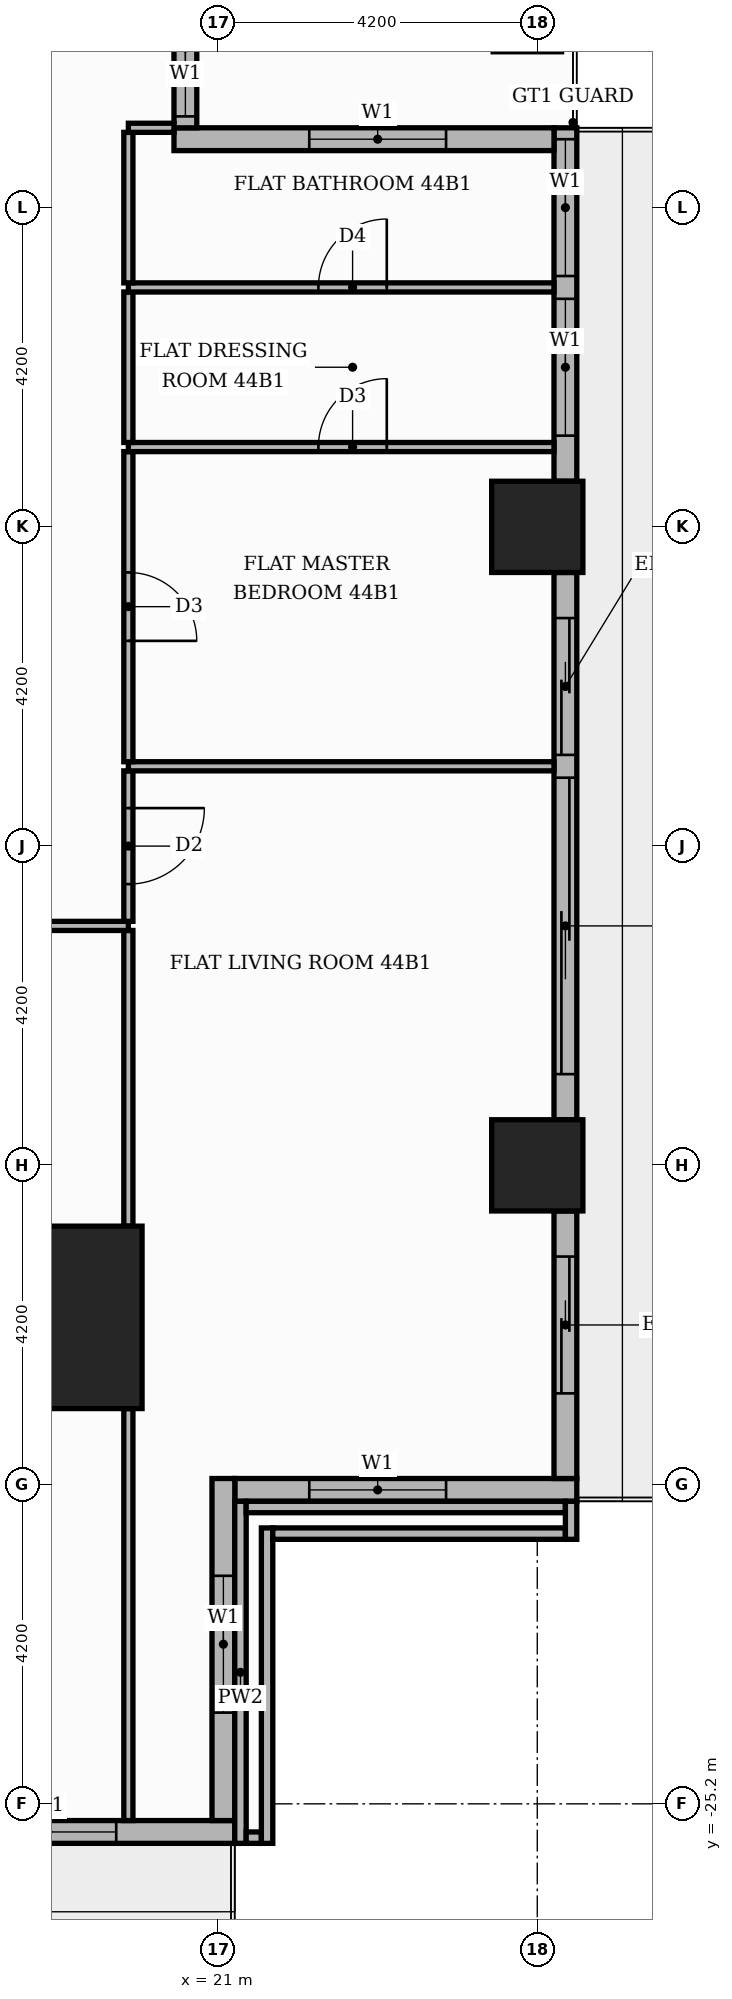
"""IFC4 building model, lengths in metres.
Left out: names, types, materials, properties, quantities, classifications, styles, units other than length and angle.
Written with IfcOpenShell. Run it as: python <this file> out.ifc"""

import sys

from ifc_helpers import new_model, si_unit, direction, frame, frame_2d, origin, origin_2d, place, context, subcontext, project, spatial, rectangle, extrude, element, fill, save


model = new_model("IFC4")
c1 = context("Model", 3, precision=1e-05, world=origin(), true_north=direction((0.0, 1.0)))
c2 = subcontext(c1, "Body", "Model", "MODEL_VIEW")
j1 = project(units=[si_unit("LENGTHUNIT", "METRE"), si_unit("PLANEANGLEUNIT", "RADIAN")], contexts=[c1])
p1 = place(None, origin())
s1 = spatial("IfcSite", under=j1, at=p1, CompositionType="ELEMENT")
p2 = place(p1, origin())
s2 = spatial("IfcBuilding", under=s1, at=p2, CompositionType="ELEMENT")
p3 = place(p2, frame((0.0, 0.0, 188.4)))
s3 = spatial("IfcBuildingStorey", under=s2, at=p3, CompositionType="ELEMENT", Elevation=188.4)
p4 = place(p3, frame((18.8, -18.8, 0.0), z_axis=(0.0, 0.0, 1.0), x_axis=(1.0, 0.0, 0.0)))
e1 = element("IfcColumn", 1, at=p4, inside=s3, PredefinedType="COLUMN", context=c2, shape_type="SweptSolid", body=[
    extrude(rectangle(XDim=2.4, YDim=2.4, at=origin_2d()), origin(), (0.0, 0.0, 1.0), 3.9),
])
for number, where, z_axis, x_axis in (
    (2, (25.2, -8.4, 0.0), (0.0, 0.0, 1.0), (1.0, 0.0, 0.0)),
    (3, (25.2, -16.8, 0.0), (0.0, 0.0, 1.0), (1.0, 0.0, 0.0)),
):
    element("IfcColumn", number, at=place(p3, frame(where, z_axis=z_axis, x_axis=x_axis)), inside=s3, PredefinedType="COLUMN", context=c2, shape_type="SweptSolid", body=[
        extrude(rectangle(XDim=1.2, YDim=1.2, at=origin_2d()), origin(), (0.0, 0.0, 1.0), 3.9),
    ])
p5 = place(p3, frame((21.22, -21.07, 0.0), z_axis=(0.0, 0.0, 1.0), x_axis=(1.0, 0.0, 0.0)))
e4 = element("IfcWall", 4, at=p5, inside=s3, PredefinedType="STANDARD", context=c2, shape_type="SweptSolid", body=[
    extrude(rectangle(XDim=4.5, YDim=0.3, at=frame_2d((2.25, 0.0))), origin(), (0.0, 0.0, 1.0), 3.48),
])
p6 = place(p5, frame((0.98, 0.0, 0.9)))
e5 = element("IfcOpeningElement", 5, at=p6, cuts=e4, PredefinedType="OPENING", context=c2, shape_type="SweptSolid", body=[
    extrude(rectangle(XDim=1.8, YDim=2.1, at=frame_2d((0.9, 1.05))), frame((0.0, 0.16, 0.0), z_axis=(0.0, -1.0, 0.0), x_axis=(1.0, 0.0, 0.0)), (0.0, 0.0, 1.0), 0.32),
])
p7 = place(p3, frame((25.57, -20.92, 0.0), z_axis=(0.0, 0.0, 1.0), x_axis=(0.0, 1.0, 0.0)))
e6 = element("IfcWall", 6, at=p7, inside=s3, PredefinedType="STANDARD", context=c2, shape_type="SweptSolid", body=[
    extrude(rectangle(XDim=3.52, YDim=0.3, at=frame_2d((1.76, 0.0))), origin(), (0.0, 0.0, 1.0), 3.48),
])
p8 = place(p7, frame((1.12, 0.0, 0.0)))
e7 = element("IfcOpeningElement", 7, at=p8, cuts=e6, PredefinedType="OPENING", context=c2, shape_type="SweptSolid", body=[
    extrude(rectangle(XDim=1.8, YDim=2.4, at=frame_2d((0.9, 1.2))), frame((0.0, 0.16, 0.0), z_axis=(0.0, -1.0, 0.0), x_axis=(1.0, 0.0, 0.0)), (0.0, 0.0, 1.0), 0.32),
])
p9 = place(p3, frame((25.57, -16.2, 0.0), z_axis=(0.0, 0.0, 1.0), x_axis=(0.0, 1.0, 0.0)))
e8 = element("IfcWall", 8, at=p9, inside=s3, PredefinedType="STANDARD", context=c2, shape_type="SweptSolid", body=[
    extrude(rectangle(XDim=7.2, YDim=0.3, at=frame_2d((3.6, 0.0))), origin(), (0.0, 0.0, 1.0), 3.48),
])
p10 = place(p9, frame((0.6, 0.0, 0.0)))
e9 = element("IfcOpeningElement", 9, at=p10, cuts=e8, PredefinedType="OPENING", context=c2, shape_type="SweptSolid", body=[
    extrude(rectangle(XDim=3.9, YDim=2.4, at=frame_2d((1.95, 1.2))), frame((0.0, 0.16, 0.0), z_axis=(0.0, -1.0, 0.0), x_axis=(1.0, 0.0, 0.0)), (0.0, 0.0, 1.0), 0.32),
])
p11 = place(p9, frame((4.8, 0.0, 0.0)))
e10 = element("IfcOpeningElement", 10, at=p11, cuts=e8, PredefinedType="OPENING", context=c2, shape_type="SweptSolid", body=[
    extrude(rectangle(XDim=1.8, YDim=2.4, at=frame_2d((0.9, 1.2))), frame((0.0, 0.16, 0.0), z_axis=(0.0, -1.0, 0.0), x_axis=(1.0, 0.0, 0.0)), (0.0, 0.0, 1.0), 0.32),
])
p12 = place(p3, frame((25.57, -7.8, 0.0), z_axis=(0.0, 0.0, 1.0), x_axis=(0.0, 1.0, 0.0)))
e11 = element("IfcWall", 11, at=p12, inside=s3, PredefinedType="STANDARD", context=c2, shape_type="SweptSolid", body=[
    extrude(rectangle(XDim=4.65, YDim=0.3, at=frame_2d((2.325, 0.0))), origin(), (0.0, 0.0, 1.0), 3.48),
])
p13 = place(p12, frame((0.6, 0.0, 0.9)))
e12 = element("IfcOpeningElement", 12, at=p13, cuts=e11, PredefinedType="OPENING", context=c2, shape_type="SweptSolid", body=[
    extrude(rectangle(XDim=1.8, YDim=2.1, at=frame_2d((0.9, 1.05))), frame((0.0, 0.16, 0.0), z_axis=(0.0, -1.0, 0.0), x_axis=(1.0, 0.0, 0.0)), (0.0, 0.0, 1.0), 0.32),
])
p14 = place(p12, frame((2.7, 0.0, 0.9)))
e13 = element("IfcOpeningElement", 13, at=p14, cuts=e11, PredefinedType="OPENING", context=c2, shape_type="SweptSolid", body=[
    extrude(rectangle(XDim=1.8, YDim=2.1, at=frame_2d((0.9, 1.05))), frame((0.0, 0.16, 0.0), z_axis=(0.0, -1.0, 0.0), x_axis=(1.0, 0.0, 0.0)), (0.0, 0.0, 1.0), 0.32),
])
p15 = place(p3, frame((25.42, -3.3, 0.0), z_axis=(0.0, 0.0, 1.0), x_axis=(-1.0, 0.0, 0.0)))
e14 = element("IfcWall", 14, at=p15, inside=s3, PredefinedType="STANDARD", context=c2, shape_type="SweptSolid", body=[
    extrude(rectangle(XDim=5.0, YDim=0.3, at=frame_2d((2.5, 0.0))), origin(), (0.0, 0.0, 1.0), 3.48),
])
p16 = place(p15, frame((1.42, 0.0, 0.9)))
e15 = element("IfcOpeningElement", 15, at=p16, cuts=e14, PredefinedType="OPENING", context=c2, shape_type="SweptSolid", body=[
    extrude(rectangle(XDim=1.8, YDim=2.1, at=frame_2d((0.9, 1.05))), frame((0.0, 0.16, 0.0), z_axis=(0.0, -1.0, 0.0), x_axis=(1.0, 0.0, 0.0)), (0.0, 0.0, 1.0), 0.32),
])
p17 = place(p3, frame((20.57, -3.15, 0.0), z_axis=(0.0, 0.0, 1.0), x_axis=(0.0, 1.0, 0.0)))
e16 = element("IfcWall", 16, at=p17, inside=s3, PredefinedType="STANDARD", context=c2, shape_type="SweptSolid", body=[
    extrude(rectangle(XDim=6.6, YDim=0.3, at=frame_2d((3.3, 0.0))), origin(), (0.0, 0.0, 1.0), 3.48),
])
p18 = place(p17, frame((0.15, 0.0, 0.9)))
e17 = element("IfcOpeningElement", 17, at=p18, cuts=e16, PredefinedType="OPENING", context=c2, shape_type="SweptSolid", body=[
    extrude(rectangle(XDim=1.8, YDim=2.1, at=frame_2d((0.9, 1.05))), frame((0.0, 0.16, 0.0), z_axis=(0.0, -1.0, 0.0), x_axis=(1.0, 0.0, 0.0)), (0.0, 0.0, 1.0), 0.32),
])
p19 = place(p17, frame((2.25, 0.0, 0.0)))
e18 = element("IfcOpeningElement", 18, at=p19, cuts=e16, PredefinedType="OPENING", context=c2, shape_type="SweptSolid", body=[
    extrude(rectangle(XDim=1.8, YDim=2.4, at=frame_2d((0.9, 1.2))), frame((0.0, 0.16, 0.0), z_axis=(0.0, -1.0, 0.0), x_axis=(1.0, 0.0, 0.0)), (0.0, 0.0, 1.0), 0.32),
])
p20 = place(p17, frame((4.35, 0.0, 0.9)))
e19 = element("IfcOpeningElement", 19, at=p20, cuts=e16, PredefinedType="OPENING", context=c2, shape_type="SweptSolid", body=[
    extrude(rectangle(XDim=1.8, YDim=2.1, at=frame_2d((0.9, 1.05))), frame((0.0, 0.16, 0.0), z_axis=(0.0, -1.0, 0.0), x_axis=(1.0, 0.0, 0.0)), (0.0, 0.0, 1.0), 0.32),
])
p21 = place(p3, frame((17.4, -25.57, 0.0), z_axis=(0.0, 0.0, 1.0), x_axis=(1.0, 0.0, 0.0)))
e20 = element("IfcWall", 20, at=p21, inside=s3, PredefinedType="STANDARD", context=c2, shape_type="SweptSolid", body=[
    extrude(rectangle(XDim=3.82, YDim=0.3, at=frame_2d((1.91, 0.0))), origin(), (0.0, 0.0, 1.0), 3.48),
])
p22 = place(p21, frame((0.46, 0.0, 0.9)))
e21 = element("IfcOpeningElement", 21, at=p22, cuts=e20, PredefinedType="OPENING", context=c2, shape_type="SweptSolid", body=[
    extrude(rectangle(XDim=1.8, YDim=2.1, at=frame_2d((0.9, 1.05))), frame((0.0, 0.16, 0.0), z_axis=(0.0, -1.0, 0.0), x_axis=(1.0, 0.0, 0.0)), (0.0, 0.0, 1.0), 0.32),
])
p23 = place(p3, frame((21.07, -25.42, 0.0), z_axis=(0.0, 0.0, 1.0), x_axis=(0.0, 1.0, 0.0)))
e22 = element("IfcWall", 22, at=p23, inside=s3, PredefinedType="STANDARD", context=c2, shape_type="SweptSolid", body=[
    extrude(rectangle(XDim=4.5, YDim=0.3, at=frame_2d((2.25, 0.0))), origin(), (0.0, 0.0, 1.0), 3.48),
])
p24 = place(p23, frame((1.42, 0.0, 0.9)))
e23 = element("IfcOpeningElement", 23, at=p24, cuts=e22, PredefinedType="OPENING", context=c2, shape_type="SweptSolid", body=[
    extrude(rectangle(XDim=1.8, YDim=2.1, at=frame_2d((0.9, 1.05))), frame((0.0, 0.16, 0.0), z_axis=(0.0, -1.0, 0.0), x_axis=(1.0, 0.0, 0.0)), (0.0, 0.0, 1.0), 0.32),
])
p25 = place(p3, frame((21.295, -25.72, 0.0), z_axis=(0.0, 0.0, 1.0), x_axis=(0.0, 1.0, 0.0)))
e24 = element("IfcWall", 24, at=p25, inside=s3, PredefinedType="PARAPET", context=c2, shape_type="SweptSolid", body=[
    extrude(rectangle(XDim=4.5, YDim=0.15, at=frame_2d((2.25, 0.0))), origin(), (0.0, 0.0, 1.0), 1.1),
])
p26 = place(p3, frame((21.37, -25.645, 0.0), z_axis=(0.0, 0.0, 1.0), x_axis=(1.0, 0.0, 0.0)))
e25 = element("IfcWall", 25, at=p26, inside=s3, PredefinedType="PARAPET", context=c2, shape_type="SweptSolid", body=[
    extrude(rectangle(XDim=0.2, YDim=0.15, at=frame_2d((0.1, 0.0))), origin(), (0.0, 0.0, 1.0), 1.1),
])
p27 = place(p3, frame((21.37, -21.295, 0.0), z_axis=(0.0, 0.0, 1.0), x_axis=(1.0, 0.0, 0.0)))
e26 = element("IfcWall", 26, at=p27, inside=s3, PredefinedType="PARAPET", context=c2, shape_type="SweptSolid", body=[
    extrude(rectangle(XDim=4.2, YDim=0.15, at=frame_2d((2.1, 0.0))), origin(), (0.0, 0.0, 1.0), 1.1),
])
p28 = place(p3, frame((21.645, -25.72, 0.0), z_axis=(0.0, 0.0, 1.0), x_axis=(0.0, 1.0, 0.0)))
e27 = element("IfcWall", 27, at=p28, inside=s3, PredefinedType="PARAPET", context=c2, shape_type="SweptSolid", body=[
    extrude(rectangle(XDim=4.15, YDim=0.15, at=frame_2d((2.075, 0.0))), origin(), (0.0, 0.0, 1.0), 1.1),
])
p29 = place(p3, frame((21.72, -21.645, 0.0), z_axis=(0.0, 0.0, 1.0), x_axis=(1.0, 0.0, 0.0)))
e28 = element("IfcWall", 28, at=p29, inside=s3, PredefinedType="PARAPET", context=c2, shape_type="SweptSolid", body=[
    extrude(rectangle(XDim=3.85, YDim=0.15, at=frame_2d((1.925, 0.0))), origin(), (0.0, 0.0, 1.0), 1.1),
])
p30 = place(p3, frame((25.645, -21.72, 0.0), z_axis=(0.0, 0.0, 1.0), x_axis=(0.0, 1.0, 0.0)))
e29 = element("IfcWall", 29, at=p30, inside=s3, PredefinedType="PARAPET", context=c2, shape_type="SweptSolid", body=[
    extrude(rectangle(XDim=0.5, YDim=0.15, at=frame_2d((0.25, 0.0))), origin(), (0.0, 0.0, 1.0), 1.1),
])
p31 = place(p3, frame((19.82, -25.42, 0.0), z_axis=(0.0, 0.0, 1.0), x_axis=(0.0, 1.0, 0.0)))
e30 = element("IfcWall", 30, at=p31, inside=s3, PredefinedType="PARTITIONING", context=c2, shape_type="SweptSolid", body=[
    extrude(rectangle(XDim=5.42, YDim=0.12, at=frame_2d((2.71, 0.0))), origin(), (0.0, 0.0, 1.0), 3.48),
])
p32 = place(p3, frame((19.82, -17.6, 0.0), z_axis=(0.0, 0.0, 1.0), x_axis=(0.0, 1.0, 0.0)))
e31 = element("IfcWall", 31, at=p32, inside=s3, PredefinedType="PARTITIONING", context=c2, shape_type="SweptSolid", body=[
    extrude(rectangle(XDim=3.89, YDim=0.12, at=frame_2d((1.945, 0.0))), origin(), (0.0, 0.0, 1.0), 3.48),
])
p33 = place(p3, frame((13.65, -13.65, 0.0), z_axis=(0.0, 0.0, 1.0), x_axis=(1.0, 0.0, 0.0)))
e32 = element("IfcWall", 32, at=p33, inside=s3, PredefinedType="PARTITIONING", context=c2, shape_type="SweptSolid", body=[
    extrude(rectangle(XDim=6.17, YDim=0.12, at=frame_2d((3.085, 0.0))), origin(), (0.0, 0.0, 1.0), 3.48),
])
p34 = place(p33, frame((2.635, 0.0, 0.0)))
e33 = element("IfcOpeningElement", 33, at=p34, cuts=e32, PredefinedType="OPENING", context=c2, shape_type="SweptSolid", body=[
    extrude(rectangle(XDim=0.9, YDim=2.1, at=frame_2d((0.45, 1.05))), frame((0.0, 0.07, 0.0), z_axis=(0.0, -1.0, 0.0), x_axis=(1.0, 0.0, 0.0)), (0.0, 0.0, 1.0), 0.14),
])
p35 = place(p3, frame((19.82, -13.59, 0.0), z_axis=(0.0, 0.0, 1.0), x_axis=(0.0, 1.0, 0.0)))
e34 = element("IfcWall", 34, at=p35, inside=s3, PredefinedType="PARTITIONING", context=c2, shape_type="SweptSolid", body=[
    extrude(rectangle(XDim=1.98, YDim=0.12, at=frame_2d((0.99, 0.0))), origin(), (0.0, 0.0, 1.0), 3.48),
])
p36 = place(p35, frame((0.49, 0.0, 0.0)))
e35 = element("IfcOpeningElement", 35, at=p36, cuts=e34, PredefinedType="OPENING", context=c2, shape_type="SweptSolid", body=[
    extrude(rectangle(XDim=1.0, YDim=2.1, at=frame_2d((0.5, 1.05))), frame((0.0, 0.07, 0.0), z_axis=(0.0, -1.0, 0.0), x_axis=(1.0, 0.0, 0.0)), (0.0, 0.0, 1.0), 0.14),
])
p37 = place(p3, frame((19.82, -11.55, 0.0), z_axis=(0.0, 0.0, 1.0), x_axis=(1.0, 0.0, 0.0)))
e36 = element("IfcWall", 36, at=p37, inside=s3, PredefinedType="PARTITIONING", context=c2, shape_type="SweptSolid", body=[
    extrude(rectangle(XDim=5.6, YDim=0.12, at=frame_2d((2.8, 0.0))), origin(), (0.0, 0.0, 1.0), 3.48),
])
p38 = place(p3, frame((19.82, -11.49, 0.0), z_axis=(0.0, 0.0, 1.0), x_axis=(0.0, 1.0, 0.0)))
e37 = element("IfcWall", 37, at=p38, inside=s3, PredefinedType="PARTITIONING", context=c2, shape_type="SweptSolid", body=[
    extrude(rectangle(XDim=4.08, YDim=0.12, at=frame_2d((2.04, 0.0))), origin(), (0.0, 0.0, 1.0), 3.48),
])
p39 = place(p38, frame((1.59, 0.0, 0.0)))
e38 = element("IfcOpeningElement", 38, at=p39, cuts=e37, PredefinedType="OPENING", context=c2, shape_type="SweptSolid", body=[
    extrude(rectangle(XDim=0.9, YDim=2.1, at=frame_2d((0.45, 1.05))), frame((0.0, 0.07, 0.0), z_axis=(0.0, -1.0, 0.0), x_axis=(1.0, 0.0, 0.0)), (0.0, 0.0, 1.0), 0.14),
])
p40 = place(p3, frame((19.82, -7.35, 0.0), z_axis=(0.0, 0.0, 1.0), x_axis=(1.0, 0.0, 0.0)))
e39 = element("IfcWall", 39, at=p40, inside=s3, PredefinedType="PARTITIONING", context=c2, shape_type="SweptSolid", body=[
    extrude(rectangle(XDim=5.6, YDim=0.12, at=frame_2d((2.8, 0.0))), origin(), (0.0, 0.0, 1.0), 3.48),
])
p41 = place(p40, frame((2.5, 0.0, 0.0)))
e40 = element("IfcOpeningElement", 40, at=p41, cuts=e39, PredefinedType="OPENING", context=c2, shape_type="SweptSolid", body=[
    extrude(rectangle(XDim=0.9, YDim=2.1, at=frame_2d((0.45, 1.05))), frame((0.0, 0.07, 0.0), z_axis=(0.0, -1.0, 0.0), x_axis=(1.0, 0.0, 0.0)), (0.0, 0.0, 1.0), 0.14),
])
p42 = place(p3, frame((19.82, -7.29, 0.0), z_axis=(0.0, 0.0, 1.0), x_axis=(0.0, 1.0, 0.0)))
e41 = element("IfcWall", 41, at=p42, inside=s3, PredefinedType="PARTITIONING", context=c2, shape_type="SweptSolid", body=[
    extrude(rectangle(XDim=1.98, YDim=0.12, at=frame_2d((0.99, 0.0))), origin(), (0.0, 0.0, 1.0), 3.48),
])
p43 = place(p3, frame((19.82, -5.25, 0.0), z_axis=(0.0, 0.0, 1.0), x_axis=(1.0, 0.0, 0.0)))
e42 = element("IfcWall", 42, at=p43, inside=s3, PredefinedType="PARTITIONING", context=c2, shape_type="SweptSolid", body=[
    extrude(rectangle(XDim=5.6, YDim=0.12, at=frame_2d((2.8, 0.0))), origin(), (0.0, 0.0, 1.0), 3.48),
])
p44 = place(p43, frame((2.5, 0.0, 0.0)))
e43 = element("IfcOpeningElement", 43, at=p44, cuts=e42, PredefinedType="OPENING", context=c2, shape_type="SweptSolid", body=[
    extrude(rectangle(XDim=0.9, YDim=2.1, at=frame_2d((0.45, 1.05))), frame((0.0, 0.07, 0.0), z_axis=(0.0, -1.0, 0.0), x_axis=(1.0, 0.0, 0.0)), (0.0, 0.0, 1.0), 0.14),
])
p45 = place(p3, frame((19.82, -5.19, 0.0), z_axis=(0.0, 0.0, 1.0), x_axis=(0.0, 1.0, 0.0)))
e44 = element("IfcWall", 44, at=p45, inside=s3, PredefinedType="PARTITIONING", context=c2, shape_type="SweptSolid", body=[
    extrude(rectangle(XDim=1.98, YDim=0.12, at=frame_2d((0.99, 0.0))), origin(), (0.0, 0.0, 1.0), 3.48),
])
p46 = place(p3, frame((19.82, -3.15, 0.0), z_axis=(0.0, 0.0, 1.0), x_axis=(1.0, 0.0, 0.0)))
e45 = element("IfcWall", 45, at=p46, inside=s3, PredefinedType="PARTITIONING", context=c2, shape_type="SweptSolid", body=[
    extrude(rectangle(XDim=0.6, YDim=0.12, at=frame_2d((0.3, 0.0))), origin(), (0.0, 0.0, 1.0), 3.48),
])
p47 = place(p6, origin())
e46 = element("IfcWindow", 46, at=p47, inside=s3, PartitioningType="SINGLE_PANEL", PredefinedType="WINDOW", context=c2, shape_type="SweptSolid", body=[
    extrude(rectangle(XDim=1.8, YDim=2.1, at=frame_2d((0.9, 1.05))), frame((0.0, 0.03, 0.0), z_axis=(0.0, -1.0, 0.0), x_axis=(1.0, 0.0, 0.0)), (0.0, 0.0, 1.0), 0.06),
])
fill(e5, e46)
p48 = place(p8, origin())
e47 = element("IfcDoor", 47, at=p48, inside=s3, OperationType="SLIDING_TO_RIGHT", PredefinedType="DOOR", context=c2, shape_type="SweptSolid", body=[
    extrude(rectangle(XDim=1.8, YDim=2.4, at=frame_2d((0.9, 1.2))), frame((0.0, 0.025, 0.0), z_axis=(0.0, -1.0, 0.0), x_axis=(1.0, 0.0, 0.0)), (0.0, 0.0, 1.0), 0.05),
])
fill(e7, e47)
p49 = place(p10, origin())
e48 = element("IfcDoor", 48, at=p49, inside=s3, OperationType="SLIDING_TO_LEFT", PredefinedType="DOOR", context=c2, shape_type="SweptSolid", body=[
    extrude(rectangle(XDim=3.9, YDim=2.4, at=frame_2d((1.95, 1.2))), frame((0.0, 0.025, 0.0), z_axis=(0.0, -1.0, 0.0), x_axis=(1.0, 0.0, 0.0)), (0.0, 0.0, 1.0), 0.05),
])
fill(e9, e48)
p50 = place(p11, origin())
e49 = element("IfcDoor", 49, at=p50, inside=s3, OperationType="SLIDING_TO_RIGHT", PredefinedType="DOOR", context=c2, shape_type="SweptSolid", body=[
    extrude(rectangle(XDim=1.8, YDim=2.4, at=frame_2d((0.9, 1.2))), frame((0.0, 0.025, 0.0), z_axis=(0.0, -1.0, 0.0), x_axis=(1.0, 0.0, 0.0)), (0.0, 0.0, 1.0), 0.05),
])
fill(e10, e49)
p51 = place(p13, origin())
e50 = element("IfcWindow", 50, at=p51, inside=s3, PartitioningType="SINGLE_PANEL", PredefinedType="WINDOW", context=c2, shape_type="SweptSolid", body=[
    extrude(rectangle(XDim=1.8, YDim=2.1, at=frame_2d((0.9, 1.05))), frame((0.0, 0.03, 0.0), z_axis=(0.0, -1.0, 0.0), x_axis=(1.0, 0.0, 0.0)), (0.0, 0.0, 1.0), 0.06),
])
fill(e12, e50)
p52 = place(p14, origin())
e51 = element("IfcWindow", 51, at=p52, inside=s3, PartitioningType="SINGLE_PANEL", PredefinedType="WINDOW", context=c2, shape_type="SweptSolid", body=[
    extrude(rectangle(XDim=1.8, YDim=2.1, at=frame_2d((0.9, 1.05))), frame((0.0, 0.03, 0.0), z_axis=(0.0, -1.0, 0.0), x_axis=(1.0, 0.0, 0.0)), (0.0, 0.0, 1.0), 0.06),
])
fill(e13, e51)
p53 = place(p16, origin())
e52 = element("IfcWindow", 52, at=p53, inside=s3, PartitioningType="SINGLE_PANEL", PredefinedType="WINDOW", context=c2, shape_type="SweptSolid", body=[
    extrude(rectangle(XDim=1.8, YDim=2.1, at=frame_2d((0.9, 1.05))), frame((0.0, 0.03, 0.0), z_axis=(0.0, -1.0, 0.0), x_axis=(1.0, 0.0, 0.0)), (0.0, 0.0, 1.0), 0.06),
])
fill(e15, e52)
p54 = place(p18, origin())
e53 = element("IfcWindow", 53, at=p54, inside=s3, PartitioningType="SINGLE_PANEL", PredefinedType="WINDOW", context=c2, shape_type="SweptSolid", body=[
    extrude(rectangle(XDim=1.8, YDim=2.1, at=frame_2d((0.9, 1.05))), frame((0.0, 0.03, 0.0), z_axis=(0.0, -1.0, 0.0), x_axis=(1.0, 0.0, 0.0)), (0.0, 0.0, 1.0), 0.06),
])
fill(e17, e53)
p55 = place(p22, origin())
e54 = element("IfcWindow", 54, at=p55, inside=s3, PartitioningType="SINGLE_PANEL", PredefinedType="WINDOW", context=c2, shape_type="SweptSolid", body=[
    extrude(rectangle(XDim=1.8, YDim=2.1, at=frame_2d((0.9, 1.05))), frame((0.0, 0.03, 0.0), z_axis=(0.0, -1.0, 0.0), x_axis=(1.0, 0.0, 0.0)), (0.0, 0.0, 1.0), 0.06),
])
fill(e21, e54)
p56 = place(p24, origin())
e55 = element("IfcWindow", 55, at=p56, inside=s3, PartitioningType="SINGLE_PANEL", PredefinedType="WINDOW", context=c2, shape_type="SweptSolid", body=[
    extrude(rectangle(XDim=1.8, YDim=2.1, at=frame_2d((0.9, 1.05))), frame((0.0, 0.03, 0.0), z_axis=(0.0, -1.0, 0.0), x_axis=(1.0, 0.0, 0.0)), (0.0, 0.0, 1.0), 0.06),
])
fill(e23, e55)
p57 = place(p36, frame((1.0, 0.0, 0.0), z_axis=(0.0, 0.0, 1.0), x_axis=(-1.0, 0.0, 0.0)))
e56 = element("IfcDoor", 56, at=p57, inside=s3, OperationType="SINGLE_SWING_RIGHT", PredefinedType="DOOR", context=c2, shape_type="SweptSolid", body=[
    extrude(rectangle(XDim=1.0, YDim=2.1, at=frame_2d((0.5, 1.05))), frame((0.0, 0.025, 0.0), z_axis=(0.0, -1.0, 0.0), x_axis=(1.0, 0.0, 0.0)), (0.0, 0.0, 1.0), 0.05),
])
fill(e35, e56)
p58 = place(p39, frame((0.9, 0.0, 0.0), z_axis=(0.0, 0.0, 1.0), x_axis=(-1.0, 0.0, 0.0)))
e57 = element("IfcDoor", 57, at=p58, inside=s3, OperationType="SINGLE_SWING_LEFT", PredefinedType="DOOR", context=c2, shape_type="SweptSolid", body=[
    extrude(rectangle(XDim=0.9, YDim=2.1, at=frame_2d((0.45, 1.05))), frame((0.0, 0.025, 0.0), z_axis=(0.0, -1.0, 0.0), x_axis=(1.0, 0.0, 0.0)), (0.0, 0.0, 1.0), 0.05),
])
fill(e38, e57)
p59 = place(p41, origin())
e58 = element("IfcDoor", 58, at=p59, inside=s3, OperationType="SINGLE_SWING_RIGHT", PredefinedType="DOOR", context=c2, shape_type="SweptSolid", body=[
    extrude(rectangle(XDim=0.9, YDim=2.1, at=frame_2d((0.45, 1.05))), frame((0.0, 0.025, 0.0), z_axis=(0.0, -1.0, 0.0), x_axis=(1.0, 0.0, 0.0)), (0.0, 0.0, 1.0), 0.05),
])
fill(e40, e58)
p60 = place(p44, origin())
e59 = element("IfcDoor", 59, at=p60, inside=s3, OperationType="SINGLE_SWING_RIGHT", PredefinedType="DOOR", context=c2, shape_type="SweptSolid", body=[
    extrude(rectangle(XDim=0.9, YDim=2.1, at=frame_2d((0.45, 1.05))), frame((0.0, 0.025, 0.0), z_axis=(0.0, -1.0, 0.0), x_axis=(1.0, 0.0, 0.0)), (0.0, 0.0, 1.0), 0.05),
])
fill(e43, e59)
save(model, sys.argv[1])
